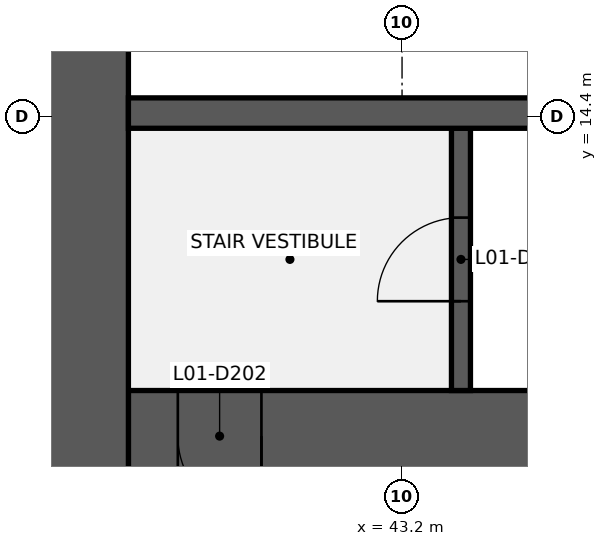
"""IFC4 building model, lengths in metres.
Left out: names, types, materials, properties, quantities, classifications, styles, units other than length and angle.
Written with IfcOpenShell. Run it as: python <this file> out.ifc"""

import sys

from ifc_helpers import new_model, si_unit, direction, frame, frame_2d, origin, place, context, subcontext, project, spatial, rectangle, extrude, element, fill, save


model = new_model("IFC4")
c1 = context("Model", 3, precision=1e-05, world=origin(), true_north=direction((0.0, 1.0)))
c2 = subcontext(c1, "Body", "Model", "MODEL_VIEW")
j1 = project(units=[si_unit("LENGTHUNIT", "METRE"), si_unit("PLANEANGLEUNIT", "RADIAN")], contexts=[c1])
p1 = place(None, origin())
s1 = spatial("IfcSite", under=j1, at=p1, CompositionType="ELEMENT")
p2 = place(p1, origin())
s2 = spatial("IfcBuilding", under=s1, at=p2, CompositionType="ELEMENT")
p3 = place(p2, frame((0.0, 0.0, 12.6)))
s3 = spatial("IfcBuildingStorey", under=s2, at=p3, CompositionType="ELEMENT", Elevation=12.6)
p4 = place(p3, frame((52.8, 10.2, 0.0), z_axis=(0.0, 0.0, 1.0), x_axis=(-1.0, 0.0, 0.0)))
e1 = element("IfcWall", 1, at=p4, inside=s3, PredefinedType="SHEAR", context=c2, shape_type="SweptSolid", body=[
    extrude(rectangle(XDim=13.2, YDim=1.2, at=frame_2d((6.6, 0.0))), origin(), (0.0, 0.0, 1.0), 4.24),
])
p5 = place(p4, frame((11.45, 0.0, 0.0)))
e2 = element("IfcOpeningElement", 2, at=p5, cuts=e1, PredefinedType="OPENING", context=c2, shape_type="SweptSolid", body=[
    extrude(rectangle(XDim=1.1, YDim=2.1, at=frame_2d((0.55, 1.05))), frame((0.0, 0.61, 0.0), z_axis=(0.0, -1.0, 0.0), x_axis=(1.0, 0.0, 0.0)), (0.0, 0.0, 1.0), 1.22),
])
p6 = place(p3, frame((39.0, 9.6, 0.0), z_axis=(0.0, 0.0, 1.0), x_axis=(0.0, 1.0, 0.0)))
e3 = element("IfcWall", 3, at=p6, inside=s3, PredefinedType="SHEAR", context=c2, shape_type="SweptSolid", body=[
    extrude(rectangle(XDim=28.8, YDim=1.2, at=frame_2d((14.4, 0.0))), origin(), (0.0, 0.0, 1.0), 4.24),
])
p7 = place(p6, frame((8.7, 0.0, 0.0)))
e4 = element("IfcOpeningElement", 4, at=p7, cuts=e3, PredefinedType="OPENING", context=c2, shape_type="SweptSolid", body=[
    extrude(rectangle(XDim=1.8, YDim=2.1, at=frame_2d((0.9, 1.05))), frame((0.0, 0.61, 0.0), z_axis=(0.0, -1.0, 0.0), x_axis=(1.0, 0.0, 0.0)), (0.0, 0.0, 1.0), 1.22),
])
p8 = place(p6, frame((18.3, 0.0, 0.0)))
e5 = element("IfcOpeningElement", 5, at=p8, cuts=e3, PredefinedType="OPENING", context=c2, shape_type="SweptSolid", body=[
    extrude(rectangle(XDim=1.8, YDim=2.1, at=frame_2d((0.9, 1.05))), frame((0.0, 0.61, 0.0), z_axis=(0.0, -1.0, 0.0), x_axis=(1.0, 0.0, 0.0)), (0.0, 0.0, 1.0), 1.22),
])
p9 = place(p3, frame((43.975, 10.8, 0.0), z_axis=(0.0, 0.0, 1.0), x_axis=(0.0, 1.0, 0.0)))
e6 = element("IfcWall", 6, at=p9, inside=s3, PredefinedType="SHEAR", context=c2, shape_type="SweptSolid", body=[
    extrude(rectangle(XDim=3.45, YDim=0.25, at=frame_2d((1.725, 0.0))), origin(), (0.0, 0.0, 1.0), 4.24),
])
p10 = place(p9, frame((1.175, 0.0, 0.0)))
e7 = element("IfcOpeningElement", 7, at=p10, cuts=e6, PredefinedType="OPENING", context=c2, shape_type="SweptSolid", body=[
    extrude(rectangle(XDim=1.1, YDim=2.1, at=frame_2d((0.55, 1.05))), frame((0.0, 0.135, 0.0), z_axis=(0.0, -1.0, 0.0), x_axis=(1.0, 0.0, 0.0)), (0.0, 0.0, 1.0), 0.27),
])
p11 = place(p3, frame((39.6, 14.45, 0.0), z_axis=(0.0, 0.0, 1.0), x_axis=(1.0, 0.0, 0.0)))
e8 = element("IfcWall", 8, at=p11, inside=s3, PredefinedType="SHEAR", context=c2, shape_type="SweptSolid", body=[
    extrude(rectangle(XDim=16.8, YDim=0.4, at=frame_2d((8.4, 0.0))), origin(), (0.0, 0.0, 1.0), 4.24),
])
p12 = place(p10, origin())
e9 = element("IfcDoor", 9, at=p12, inside=s3, OperationType="SINGLE_SWING_LEFT", PredefinedType="DOOR", context=c2, shape_type="SweptSolid", body=[
    extrude(rectangle(XDim=1.1, YDim=2.1, at=frame_2d((0.55, 1.05))), frame((0.0, 0.025, 0.0), z_axis=(0.0, -1.0, 0.0), x_axis=(1.0, 0.0, 0.0)), (0.0, 0.0, 1.0), 0.05),
])
fill(e7, e9)
p13 = place(p5, origin())
e10 = element("IfcDoor", 10, at=p13, inside=s3, OperationType="SINGLE_SWING_LEFT", PredefinedType="DOOR", context=c2, shape_type="SweptSolid", body=[
    extrude(rectangle(XDim=1.1, YDim=2.1, at=frame_2d((0.55, 1.05))), frame((0.0, 0.025, 0.0), z_axis=(0.0, -1.0, 0.0), x_axis=(1.0, 0.0, 0.0)), (0.0, 0.0, 1.0), 0.05),
])
fill(e2, e10)
save(model, sys.argv[1])
